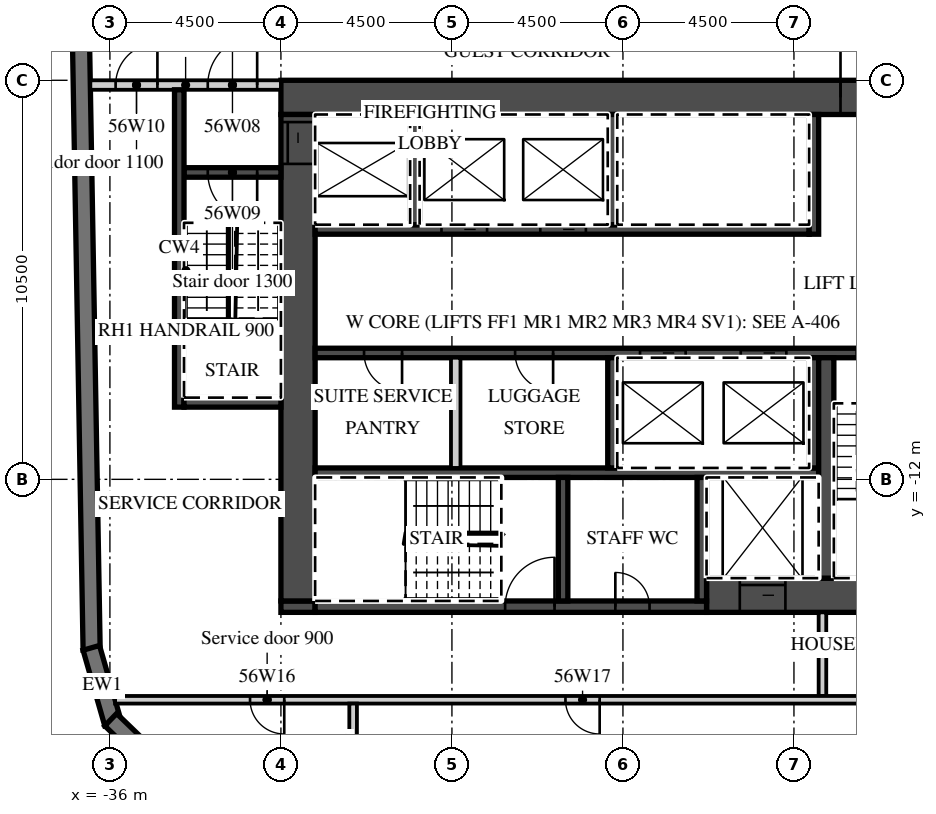
"""IFC4 building model, lengths in metres.
Left out: names, types, materials, properties, quantities, classifications, styles, units other than length and angle.
Written with IfcOpenShell. Run it as: python <this file> out.ifc"""

import sys

from ifc_helpers import new_model, si_unit, direction, frame, frame_2d, origin, place, context, subcontext, project, spatial, polyline, rectangle, outline, extrude, element, fill, save


model = new_model("IFC4")
c1 = context("Model", 3, precision=1e-05, world=origin(), true_north=direction((0.0, 1.0)))
c2 = subcontext(c1, "Body", "Model", "MODEL_VIEW")
j1 = project(units=[si_unit("LENGTHUNIT", "METRE"), si_unit("PLANEANGLEUNIT", "RADIAN")], contexts=[c1])
p1 = place(None, origin())
s1 = spatial("IfcSite", under=j1, at=p1, CompositionType="ELEMENT")
p2 = place(p1, origin())
s2 = spatial("IfcBuilding", under=s1, at=p2, CompositionType="ELEMENT")
p3 = place(p2, frame((0.0, 0.0, 230.9)))
s3 = spatial("IfcBuildingStorey", under=s2, at=p3, CompositionType="ELEMENT", Elevation=230.9)
p4 = place(p3, frame((-37.057, 16.503, 0.0), z_axis=(0.0, 0.0, 1.0), x_axis=(0.017452279857, -0.999847697366, 0.0)))
e1 = element("IfcWall", 1, at=p4, inside=s3, PredefinedType="SOLIDWALL", context=c2, shape_type="SweptSolid", body=[
    extrude(rectangle(XDim=33.0, YDim=0.45, at=frame_2d((16.5, 0.0))), origin(), (0.0, 0.0, 1.0), 3.02),
])
p5 = place(p3, frame((-36.49, -16.434, 0.0), z_axis=(0.0, 0.0, 1.0), x_axis=(0.275577603096, -0.961278827745, 0.0)))
e2 = element("IfcWall", 2, at=p5, inside=s3, PredefinedType="SOLIDWALL", context=c2, shape_type="SweptSolid", body=[
    extrude(outline(polyline([(0.0, -0.225), (2.071, -0.225), (1.95, 0.225), (0.121, 0.225), (0.0, -0.225)])), origin(), (0.0, 0.0, 1.0), 3.02),
])
p6 = place(p3, frame((-35.979, -18.324, 0.0), z_axis=(0.0, 0.0, 1.0), x_axis=(0.719320193998, -0.694678672846, 0.0)))
e3 = element("IfcWall", 3, at=p6, inside=s3, PredefinedType="SOLIDWALL", context=c2, shape_type="SweptSolid", body=[
    extrude(outline(polyline([(0.0, -0.225), (2.071, -0.225), (1.95, 0.225), (0.121, 0.225), (0.0, -0.225)])), origin(), (0.0, 0.0, 1.0), 3.02),
])
p7 = place(p3, frame((-31.5, -1.95, 0.0), z_axis=(0.0, 0.0, 1.0), x_axis=(1.0, 0.0, 0.0)))
e4 = element("IfcWall", 4, at=p7, inside=s3, PredefinedType="SHEAR", context=c2, shape_type="SweptSolid", body=[
    extrude(rectangle(XDim=18.0, YDim=0.9, at=frame_2d((9.0, 0.0))), origin(), (0.0, 0.0, 1.0), 3.02),
])
p8 = place(p7, frame((14.725, 0.0, 0.0)))
e5 = element("IfcOpeningElement", 5, at=p8, cuts=e4, PredefinedType="OPENING", context=c2, shape_type="SweptSolid", body=[
    extrude(rectangle(XDim=1.8, YDim=2.1, at=frame_2d((0.9, 1.05))), frame((0.0, 0.46, 0.0), z_axis=(0.0, -1.0, 0.0), x_axis=(1.0, 0.0, 0.0)), (0.0, 0.0, 1.0), 0.92),
])
p9 = place(p3, frame((-20.3, -15.05, 0.0), z_axis=(0.0, 0.0, 1.0), x_axis=(1.0, 0.0, 0.0)))
e6 = element("IfcWall", 6, at=p9, inside=s3, PredefinedType="SHEAR", context=c2, shape_type="SweptSolid", body=[
    extrude(rectangle(XDim=6.8, YDim=0.9, at=frame_2d((3.4, 0.0))), origin(), (0.0, 0.0, 1.0), 3.02),
])
p10 = place(p9, frame((0.875, 0.0, 0.0)))
e7 = element("IfcOpeningElement", 7, at=p10, cuts=e6, PredefinedType="OPENING", context=c2, shape_type="SweptSolid", body=[
    extrude(rectangle(XDim=1.2, YDim=2.1, at=frame_2d((0.6, 1.05))), frame((0.0, 0.46, 0.0), z_axis=(0.0, -1.0, 0.0), x_axis=(1.0, 0.0, 0.0)), (0.0, 0.0, 1.0), 0.92),
])
p11 = place(p3, frame((-31.5, -15.35, 0.0), z_axis=(0.0, 0.0, 1.0), x_axis=(1.0, 0.0, 0.0)))
e8 = element("IfcWall", 8, at=p11, inside=s3, PredefinedType="SHEAR", context=c2, shape_type="SweptSolid", body=[
    extrude(rectangle(XDim=0.9, YDim=0.3, at=frame_2d((0.45, 0.0))), origin(), (0.0, 0.0, 1.0), 3.02),
])
p12 = place(p3, frame((-30.6, -15.35, 0.0), z_axis=(0.0, 0.0, 1.0), x_axis=(1.0, 0.0, 0.0)))
e9 = element("IfcWall", 9, at=p12, inside=s3, PredefinedType="SHEAR", context=c2, shape_type="SweptSolid", body=[
    extrude(rectangle(XDim=10.3, YDim=0.3, at=frame_2d((5.15, 0.0))), origin(), (0.0, 0.0, 1.0), 3.02),
])
p13 = place(p12, frame((5.0, 0.0, 0.0)))
e10 = element("IfcOpeningElement", 10, at=p13, cuts=e9, PredefinedType="OPENING", context=c2, shape_type="SweptSolid", body=[
    extrude(rectangle(XDim=1.3, YDim=2.1, at=frame_2d((0.65, 1.05))), frame((0.0, 0.16, 0.0), z_axis=(0.0, -1.0, 0.0), x_axis=(1.0, 0.0, 0.0)), (0.0, 0.0, 1.0), 0.32),
])
p14 = place(p12, frame((7.9, 0.0, 0.0)))
e11 = element("IfcOpeningElement", 11, at=p14, cuts=e9, PredefinedType="OPENING", context=c2, shape_type="SweptSolid", body=[
    extrude(rectangle(XDim=0.9, YDim=2.1, at=frame_2d((0.45, 1.05))), frame((0.0, 0.16, 0.0), z_axis=(0.0, -1.0, 0.0), x_axis=(1.0, 0.0, 0.0)), (0.0, 0.0, 1.0), 0.32),
])
p15 = place(p3, frame((-31.05, -15.2, 0.0), z_axis=(0.0, 0.0, 1.0), x_axis=(0.0, 1.0, 0.0)))
e12 = element("IfcWall", 12, at=p15, inside=s3, PredefinedType="SHEAR", context=c2, shape_type="SweptSolid", body=[
    extrude(rectangle(XDim=12.8, YDim=0.9, at=frame_2d((6.4, 0.0))), origin(), (0.0, 0.0, 1.0), 3.02),
])
p16 = place(p15, frame((11.5, 0.0, 0.0)))
e13 = element("IfcOpeningElement", 13, at=p16, cuts=e12, PredefinedType="OPENING", context=c2, shape_type="SweptSolid", body=[
    extrude(rectangle(XDim=1.1, YDim=2.1, at=frame_2d((0.55, 1.05))), frame((0.0, 0.46, 0.0), z_axis=(0.0, -1.0, 0.0), x_axis=(1.0, 0.0, 0.0)), (0.0, 0.0, 1.0), 0.92),
])
p17 = place(p3, frame((-30.6, -5.425, 0.0), z_axis=(0.0, 0.0, 1.0), x_axis=(1.0, 0.0, 0.0)))
e14 = element("IfcWall", 14, at=p17, inside=s3, PredefinedType="SHEAR", context=c2, shape_type="SweptSolid", body=[
    extrude(rectangle(XDim=13.0, YDim=0.25, at=frame_2d((6.5, 0.0))), origin(), (0.0, 0.0, 1.0), 3.02),
])
p18 = place(p17, frame((3.325, 0.0, 0.0)))
e15 = element("IfcOpeningElement", 15, at=p18, cuts=e14, PredefinedType="OPENING", context=c2, shape_type="SweptSolid", body=[
    extrude(rectangle(XDim=1.2, YDim=2.1, at=frame_2d((0.6, 1.05))), frame((0.0, 0.135, 0.0), z_axis=(0.0, -1.0, 0.0), x_axis=(1.0, 0.0, 0.0)), (0.0, 0.0, 1.0), 0.27),
])
p19 = place(p17, frame((5.925, 0.0, 0.0)))
e16 = element("IfcOpeningElement", 16, at=p19, cuts=e14, PredefinedType="OPENING", context=c2, shape_type="SweptSolid", body=[
    extrude(rectangle(XDim=1.2, YDim=2.1, at=frame_2d((0.6, 1.05))), frame((0.0, 0.135, 0.0), z_axis=(0.0, -1.0, 0.0), x_axis=(1.0, 0.0, 0.0)), (0.0, 0.0, 1.0), 0.27),
])
p20 = place(p3, frame((-17.475, -5.55, 0.0), z_axis=(0.0, 0.0, 1.0), x_axis=(0.0, 1.0, 0.0)))
e17 = element("IfcWall", 17, at=p20, inside=s3, PredefinedType="SHEAR", context=c2, shape_type="SweptSolid", body=[
    extrude(rectangle(XDim=3.15, YDim=0.25, at=frame_2d((1.575, 0.0))), origin(), (0.0, 0.0, 1.0), 3.02),
])
for number, where, z_axis, x_axis in (
    (18, (-27.975, -5.3, 0.0), (0.0, 0.0, 1.0), (0.0, 1.0, 0.0)),
    (19, (-22.775, -5.3, 0.0), (0.0, 0.0, 1.0), (0.0, 1.0, 0.0)),
):
    element("IfcWall", number, at=place(p3, frame(where, z_axis=z_axis, x_axis=x_axis)), inside=s3, PredefinedType="SHEAR", context=c2, shape_type="SweptSolid", body=[
        extrude(rectangle(XDim=2.9, YDim=0.25, at=frame_2d((1.45, 0.0))), origin(), (0.0, 0.0, 1.0), 3.02),
    ])
p21 = place(p3, frame((-30.6, -8.675, 0.0), z_axis=(0.0, 0.0, 1.0), x_axis=(1.0, 0.0, 0.0)))
e20 = element("IfcWall", 20, at=p21, inside=s3, PredefinedType="SHEAR", context=c2, shape_type="SweptSolid", body=[
    extrude(rectangle(XDim=16.2, YDim=0.25, at=frame_2d((8.1, 0.0))), origin(), (0.0, 0.0, 1.0), 3.02),
])
p22 = place(p21, frame((8.55, 0.0, 0.0)))
e21 = element("IfcOpeningElement", 21, at=p22, cuts=e20, PredefinedType="OPENING", context=c2, shape_type="SweptSolid", body=[
    extrude(rectangle(XDim=1.2, YDim=2.1, at=frame_2d((0.6, 1.05))), frame((0.0, 0.135, 0.0), z_axis=(0.0, -1.0, 0.0), x_axis=(1.0, 0.0, 0.0)), (0.0, 0.0, 1.0), 0.27),
])
p23 = place(p21, frame((11.2, 0.0, 0.0)))
e22 = element("IfcOpeningElement", 22, at=p23, cuts=e20, PredefinedType="OPENING", context=c2, shape_type="SweptSolid", body=[
    extrude(rectangle(XDim=1.2, YDim=2.1, at=frame_2d((0.6, 1.05))), frame((0.0, 0.135, 0.0), z_axis=(0.0, -1.0, 0.0), x_axis=(1.0, 0.0, 0.0)), (0.0, 0.0, 1.0), 0.27),
])
p24 = place(p21, frame((14.25, 0.0, 0.0)))
e23 = element("IfcOpeningElement", 23, at=p24, cuts=e20, PredefinedType="OPENING", context=c2, shape_type="SweptSolid", body=[
    extrude(rectangle(XDim=1.3, YDim=2.1, at=frame_2d((0.65, 1.05))), frame((0.0, 0.135, 0.0), z_axis=(0.0, -1.0, 0.0), x_axis=(1.0, 0.0, 0.0)), (0.0, 0.0, 1.0), 0.27),
])
p25 = place(p21, frame((1.288, 0.0, 0.0)))
e24 = element("IfcOpeningElement", 24, at=p25, cuts=e20, PredefinedType="OPENING", context=c2, shape_type="SweptSolid", body=[
    extrude(rectangle(XDim=1.0, YDim=2.1, at=frame_2d((0.5, 1.05))), frame((0.0, 0.135, 0.0), z_axis=(0.0, -1.0, 0.0), x_axis=(1.0, 0.0, 0.0)), (0.0, 0.0, 1.0), 0.27),
])
p26 = place(p21, frame((5.262, 0.0, 0.0)))
e25 = element("IfcOpeningElement", 25, at=p26, cuts=e20, PredefinedType="OPENING", context=c2, shape_type="SweptSolid", body=[
    extrude(rectangle(XDim=1.0, YDim=2.1, at=frame_2d((0.5, 1.05))), frame((0.0, 0.135, 0.0), z_axis=(0.0, -1.0, 0.0), x_axis=(1.0, 0.0, 0.0)), (0.0, 0.0, 1.0), 0.27),
])
p27 = place(p3, frame((-30.6, -11.825, 0.0), z_axis=(0.0, 0.0, 1.0), x_axis=(1.0, 0.0, 0.0)))
e26 = element("IfcWall", 26, at=p27, inside=s3, PredefinedType="SHEAR", context=c2, shape_type="SweptSolid", body=[
    extrude(rectangle(XDim=13.25, YDim=0.25, at=frame_2d((6.625, 0.0))), origin(), (0.0, 0.0, 1.0), 3.02),
])
for number, where, z_axis, x_axis in (
    (27, (-17.475, -11.7, 0.0), (0.0, 0.0, 1.0), (0.0, 1.0, 0.0)),
    (28, (-22.775, -11.7, 0.0), (0.0, 0.0, 1.0), (0.0, 1.0, 0.0)),
):
    element("IfcWall", number, at=place(p3, frame(where, z_axis=z_axis, x_axis=x_axis)), inside=s3, PredefinedType="SHEAR", context=c2, shape_type="SweptSolid", body=[
        extrude(rectangle(XDim=2.9, YDim=0.25, at=frame_2d((1.45, 0.0))), origin(), (0.0, 0.0, 1.0), 3.02),
    ])
p28 = place(p3, frame((-26.9, -11.7, 0.0), z_axis=(0.0, 0.0, 1.0), x_axis=(0.0, 1.0, 0.0)))
e29 = element("IfcWall", 29, at=p28, inside=s3, PredefinedType="PARTITIONING", context=c2, shape_type="SweptSolid", body=[
    extrude(rectangle(XDim=2.9, YDim=0.25, at=frame_2d((1.45, 0.0))), origin(), (0.0, 0.0, 1.0), 3.02),
])
p29 = place(p3, frame((-17.15, -14.6, 0.0), z_axis=(0.0, 0.0, 1.0), x_axis=(0.0, 1.0, 0.0)))
e30 = element("IfcWall", 30, at=p29, inside=s3, PredefinedType="SHEAR", context=c2, shape_type="SweptSolid", body=[
    extrude(rectangle(XDim=5.8, YDim=0.4, at=frame_2d((2.9, 0.0))), origin(), (0.0, 0.0, 1.0), 3.02),
])
for number, where, z_axis, x_axis in (
    (31, (-20.425, -15.2, 0.0), (0.0, 0.0, 1.0), (0.0, 1.0, 0.0)),
    (32, (-24.075, -15.2, 0.0), (0.0, 0.0, 1.0), (0.0, 1.0, 0.0)),
):
    element("IfcWall", number, at=place(p3, frame(where, z_axis=z_axis, x_axis=x_axis)), inside=s3, PredefinedType="SHEAR", context=c2, shape_type="SweptSolid", body=[
        extrude(rectangle(XDim=3.25, YDim=0.25, at=frame_2d((1.625, 0.0))), origin(), (0.0, 0.0, 1.0), 3.02),
    ])
p30 = place(p3, frame((-36.515, -1.625, 0.0), z_axis=(0.0, 0.0, 1.0), x_axis=(1.0, 0.0, 0.0)))
e33 = element("IfcWall", 33, at=p30, inside=s3, PredefinedType="PARTITIONING", context=c2, shape_type="SweptSolid", body=[
    extrude(rectangle(XDim=5.015, YDim=0.25, at=frame_2d((2.508, 0.0))), origin(), (0.0, 0.0, 1.0), 3.02),
])
p31 = place(p30, frame((3.09, 0.0, 0.0)))
e34 = element("IfcOpeningElement", 34, at=p31, cuts=e33, PredefinedType="OPENING", context=c2, shape_type="SweptSolid", body=[
    extrude(rectangle(XDim=1.3, YDim=2.1, at=frame_2d((0.65, 1.05))), frame((0.0, 0.135, 0.0), z_axis=(0.0, -1.0, 0.0), x_axis=(1.0, 0.0, 0.0)), (0.0, 0.0, 1.0), 0.27),
])
p32 = place(p30, frame((0.665, 0.0, 0.0)))
e35 = element("IfcOpeningElement", 35, at=p32, cuts=e33, PredefinedType="OPENING", context=c2, shape_type="SweptSolid", body=[
    extrude(rectangle(XDim=1.1, YDim=2.1, at=frame_2d((0.55, 1.05))), frame((0.0, 0.135, 0.0), z_axis=(0.0, -1.0, 0.0), x_axis=(1.0, 0.0, 0.0)), (0.0, 0.0, 1.0), 0.27),
])
p33 = place(p3, frame((-34.05, -3.925, 0.0), z_axis=(0.0, 0.0, 1.0), x_axis=(1.0, 0.0, 0.0)))
e36 = element("IfcWall", 36, at=p33, inside=s3, PredefinedType="SHEAR", context=c2, shape_type="SweptSolid", body=[
    extrude(rectangle(XDim=2.55, YDim=0.25, at=frame_2d((1.275, 0.0))), origin(), (0.0, 0.0, 1.0), 3.02),
])
p34 = place(p33, frame((0.625, 0.0, 0.0)))
e37 = element("IfcOpeningElement", 37, at=p34, cuts=e36, PredefinedType="OPENING", context=c2, shape_type="SweptSolid", body=[
    extrude(rectangle(XDim=1.3, YDim=2.1, at=frame_2d((0.65, 1.05))), frame((0.0, 0.135, 0.0), z_axis=(0.0, -1.0, 0.0), x_axis=(1.0, 0.0, 0.0)), (0.0, 0.0, 1.0), 0.27),
])
p35 = place(p3, frame((-34.175, -10.1, 0.0), z_axis=(0.0, 0.0, 1.0), x_axis=(0.0, 1.0, 0.0)))
e38 = element("IfcWall", 38, at=p35, inside=s3, PredefinedType="SHEAR", context=c2, shape_type="SweptSolid", body=[
    extrude(rectangle(XDim=8.35, YDim=0.25, at=frame_2d((4.175, 0.0))), origin(), (0.0, 0.0, 1.0), 3.02),
])
p36 = place(p3, frame((-34.05, -9.975, 0.0), z_axis=(0.0, 0.0, 1.0), x_axis=(1.0, 0.0, 0.0)))
e39 = element("IfcWall", 39, at=p36, inside=s3, PredefinedType="SHEAR", context=c2, shape_type="SweptSolid", body=[
    extrude(rectangle(XDim=2.55, YDim=0.25, at=frame_2d((1.275, 0.0))), origin(), (0.0, 0.0, 1.0), 3.02),
])
p37 = place(p3, frame((-17.25, -17.7, 0.0), z_axis=(0.0, 0.0, 1.0), x_axis=(0.0, 1.0, 0.0)))
e40 = element("IfcWall", 40, at=p37, inside=s3, PredefinedType="PARTITIONING", context=c2, shape_type="SweptSolid", body=[
    extrude(rectangle(XDim=2.2, YDim=0.2, at=frame_2d((1.1, 0.0))), origin(), (0.0, 0.0, 1.0), 3.02),
])
p38 = place(p3, frame((-35.864, -17.8, 0.0), z_axis=(0.0, 0.0, 1.0), x_axis=(1.0, 0.0, 0.0)))
e41 = element("IfcWall", 41, at=p38, inside=s3, PredefinedType="PARTITIONING", context=c2, shape_type="SweptSolid", body=[
    extrude(rectangle(XDim=22.264, YDim=0.2, at=frame_2d((11.132, 0.0))), origin(), (0.0, 0.0, 1.0), 3.02),
])
p39 = place(p38, frame((3.551, 0.0, 0.0)))
e42 = element("IfcOpeningElement", 42, at=p39, cuts=e41, PredefinedType="OPENING", context=c2, shape_type="SweptSolid", body=[
    extrude(rectangle(XDim=0.9, YDim=2.1, at=frame_2d((0.45, 1.05))), frame((0.0, 0.11, 0.0), z_axis=(0.0, -1.0, 0.0), x_axis=(1.0, 0.0, 0.0)), (0.0, 0.0, 1.0), 0.22),
])
p40 = place(p38, frame((11.851, 0.0, 0.0)))
e43 = element("IfcOpeningElement", 43, at=p40, cuts=e41, PredefinedType="OPENING", context=c2, shape_type="SweptSolid", body=[
    extrude(rectangle(XDim=0.9, YDim=2.1, at=frame_2d((0.45, 1.05))), frame((0.0, 0.11, 0.0), z_axis=(0.0, -1.0, 0.0), x_axis=(1.0, 0.0, 0.0)), (0.0, 0.0, 1.0), 0.22),
])
p41 = place(p3, frame((-29.6, -19.922, 0.0), z_axis=(0.0, 0.0, 1.0), x_axis=(0.0, 1.0, 0.0)))
e44 = element("IfcWall", 44, at=p41, inside=s3, PredefinedType="PARTITIONING", context=c2, shape_type="SweptSolid", body=[
    extrude(rectangle(XDim=2.022, YDim=0.2, at=frame_2d((1.011, 0.0))), origin(), (0.0, 0.0, 1.0), 3.02),
])
p42 = place(p22, origin())
e45 = element("IfcDoor", 45, at=p42, inside=s3, OperationType="SLIDING_TO_LEFT", PredefinedType="DOOR", context=c2, shape_type="SweptSolid", body=[
    extrude(rectangle(XDim=1.2, YDim=2.1, at=frame_2d((0.6, 1.05))), frame((0.0, 0.025, 0.0), z_axis=(0.0, -1.0, 0.0), x_axis=(1.0, 0.0, 0.0)), (0.0, 0.0, 1.0), 0.05),
])
fill(e21, e45)
p43 = place(p23, origin())
e46 = element("IfcDoor", 46, at=p43, inside=s3, OperationType="SLIDING_TO_RIGHT", PredefinedType="DOOR", context=c2, shape_type="SweptSolid", body=[
    extrude(rectangle(XDim=1.2, YDim=2.1, at=frame_2d((0.6, 1.05))), frame((0.0, 0.025, 0.0), z_axis=(0.0, -1.0, 0.0), x_axis=(1.0, 0.0, 0.0)), (0.0, 0.0, 1.0), 0.05),
])
fill(e22, e46)
p44 = place(p18, origin())
e47 = element("IfcDoor", 47, at=p44, inside=s3, OperationType="SLIDING_TO_RIGHT", PredefinedType="DOOR", context=c2, shape_type="SweptSolid", body=[
    extrude(rectangle(XDim=1.2, YDim=2.1, at=frame_2d((0.6, 1.05))), frame((0.0, 0.025, 0.0), z_axis=(0.0, -1.0, 0.0), x_axis=(1.0, 0.0, 0.0)), (0.0, 0.0, 1.0), 0.05),
])
fill(e15, e47)
p45 = place(p19, origin())
e48 = element("IfcDoor", 48, at=p45, inside=s3, OperationType="SLIDING_TO_RIGHT", PredefinedType="DOOR", context=c2, shape_type="SweptSolid", body=[
    extrude(rectangle(XDim=1.2, YDim=2.1, at=frame_2d((0.6, 1.05))), frame((0.0, 0.025, 0.0), z_axis=(0.0, -1.0, 0.0), x_axis=(1.0, 0.0, 0.0)), (0.0, 0.0, 1.0), 0.05),
])
fill(e16, e48)
p46 = place(p10, origin())
e49 = element("IfcDoor", 49, at=p46, inside=s3, OperationType="SLIDING_TO_LEFT", PredefinedType="DOOR", context=c2, shape_type="SweptSolid", body=[
    extrude(rectangle(XDim=1.2, YDim=2.1, at=frame_2d((0.6, 1.05))), frame((0.0, 0.025, 0.0), z_axis=(0.0, -1.0, 0.0), x_axis=(1.0, 0.0, 0.0)), (0.0, 0.0, 1.0), 0.05),
])
fill(e7, e49)
p47 = place(p16, origin())
e50 = element("IfcDoor", 50, at=p47, inside=s3, OperationType="SLIDING_TO_RIGHT", PredefinedType="DOOR", context=c2, shape_type="SweptSolid", body=[
    extrude(rectangle(XDim=1.1, YDim=2.1, at=frame_2d((0.55, 1.05))), frame((0.0, 0.025, 0.0), z_axis=(0.0, -1.0, 0.0), x_axis=(1.0, 0.0, 0.0)), (0.0, 0.0, 1.0), 0.05),
])
fill(e13, e50)
p48 = place(p8, origin())
e51 = element("IfcDoor", 51, at=p48, inside=s3, OperationType="DOUBLE_DOOR_DOUBLE_SWING", PredefinedType="DOOR", context=c2, shape_type="SweptSolid", body=[
    extrude(rectangle(XDim=1.8, YDim=2.1, at=frame_2d((0.9, 1.05))), frame((0.0, 0.025, 0.0), z_axis=(0.0, -1.0, 0.0), x_axis=(1.0, 0.0, 0.0)), (0.0, 0.0, 1.0), 0.05),
])
fill(e5, e51)
p49 = place(p31, origin())
e52 = element("IfcDoor", 52, at=p49, inside=s3, OperationType="SINGLE_SWING_RIGHT", PredefinedType="DOOR", context=c2, shape_type="SweptSolid", body=[
    extrude(rectangle(XDim=1.3, YDim=2.1, at=frame_2d((0.65, 1.05))), frame((0.0, 0.025, 0.0), z_axis=(0.0, -1.0, 0.0), x_axis=(1.0, 0.0, 0.0)), (0.0, 0.0, 1.0), 0.05),
])
fill(e34, e52)
p50 = place(p34, origin())
e53 = element("IfcDoor", 53, at=p50, inside=s3, OperationType="SINGLE_SWING_RIGHT", PredefinedType="DOOR", context=c2, shape_type="SweptSolid", body=[
    extrude(rectangle(XDim=1.3, YDim=2.1, at=frame_2d((0.65, 1.05))), frame((0.0, 0.025, 0.0), z_axis=(0.0, -1.0, 0.0), x_axis=(1.0, 0.0, 0.0)), (0.0, 0.0, 1.0), 0.05),
])
fill(e37, e53)
p51 = place(p32, origin())
e54 = element("IfcDoor", 54, at=p51, inside=s3, OperationType="SINGLE_SWING_RIGHT", PredefinedType="DOOR", context=c2, shape_type="SweptSolid", body=[
    extrude(rectangle(XDim=1.1, YDim=2.1, at=frame_2d((0.55, 1.05))), frame((0.0, 0.025, 0.0), z_axis=(0.0, -1.0, 0.0), x_axis=(1.0, 0.0, 0.0)), (0.0, 0.0, 1.0), 0.05),
])
fill(e35, e54)
p52 = place(p24, origin())
e55 = element("IfcDoor", 55, at=p52, inside=s3, OperationType="SINGLE_SWING_RIGHT", PredefinedType="DOOR", context=c2, shape_type="SweptSolid", body=[
    extrude(rectangle(XDim=1.3, YDim=2.1, at=frame_2d((0.65, 1.05))), frame((0.0, 0.025, 0.0), z_axis=(0.0, -1.0, 0.0), x_axis=(1.0, 0.0, 0.0)), (0.0, 0.0, 1.0), 0.05),
])
fill(e23, e55)
p53 = place(p13, origin())
e56 = element("IfcDoor", 56, at=p53, inside=s3, OperationType="SINGLE_SWING_RIGHT", PredefinedType="DOOR", context=c2, shape_type="SweptSolid", body=[
    extrude(rectangle(XDim=1.3, YDim=2.1, at=frame_2d((0.65, 1.05))), frame((0.0, 0.025, 0.0), z_axis=(0.0, -1.0, 0.0), x_axis=(1.0, 0.0, 0.0)), (0.0, 0.0, 1.0), 0.05),
])
fill(e10, e56)
p54 = place(p14, origin())
e57 = element("IfcDoor", 57, at=p54, inside=s3, OperationType="SINGLE_SWING_LEFT", PredefinedType="DOOR", context=c2, shape_type="SweptSolid", body=[
    extrude(rectangle(XDim=0.9, YDim=2.1, at=frame_2d((0.45, 1.05))), frame((0.0, 0.025, 0.0), z_axis=(0.0, -1.0, 0.0), x_axis=(1.0, 0.0, 0.0)), (0.0, 0.0, 1.0), 0.05),
])
fill(e11, e57)
p55 = place(p25, origin())
e58 = element("IfcDoor", 58, at=p55, inside=s3, OperationType="SINGLE_SWING_RIGHT", PredefinedType="DOOR", context=c2, shape_type="SweptSolid", body=[
    extrude(rectangle(XDim=1.0, YDim=2.1, at=frame_2d((0.5, 1.05))), frame((0.0, 0.025, 0.0), z_axis=(0.0, -1.0, 0.0), x_axis=(1.0, 0.0, 0.0)), (0.0, 0.0, 1.0), 0.05),
])
fill(e24, e58)
p56 = place(p26, origin())
e59 = element("IfcDoor", 59, at=p56, inside=s3, OperationType="SINGLE_SWING_RIGHT", PredefinedType="DOOR", context=c2, shape_type="SweptSolid", body=[
    extrude(rectangle(XDim=1.0, YDim=2.1, at=frame_2d((0.5, 1.05))), frame((0.0, 0.025, 0.0), z_axis=(0.0, -1.0, 0.0), x_axis=(1.0, 0.0, 0.0)), (0.0, 0.0, 1.0), 0.05),
])
fill(e25, e59)
p57 = place(p39, origin())
e60 = element("IfcDoor", 60, at=p57, inside=s3, OperationType="SINGLE_SWING_RIGHT", PredefinedType="DOOR", context=c2, shape_type="SweptSolid", body=[
    extrude(rectangle(XDim=0.9, YDim=2.1, at=frame_2d((0.45, 1.05))), frame((0.0, 0.025, 0.0), z_axis=(0.0, -1.0, 0.0), x_axis=(1.0, 0.0, 0.0)), (0.0, 0.0, 1.0), 0.05),
])
fill(e42, e60)
p58 = place(p40, origin())
e61 = element("IfcDoor", 61, at=p58, inside=s3, OperationType="SINGLE_SWING_RIGHT", PredefinedType="DOOR", context=c2, shape_type="SweptSolid", body=[
    extrude(rectangle(XDim=0.9, YDim=2.1, at=frame_2d((0.45, 1.05))), frame((0.0, 0.025, 0.0), z_axis=(0.0, -1.0, 0.0), x_axis=(1.0, 0.0, 0.0)), (0.0, 0.0, 1.0), 0.05),
])
fill(e43, e61)
save(model, sys.argv[1])
